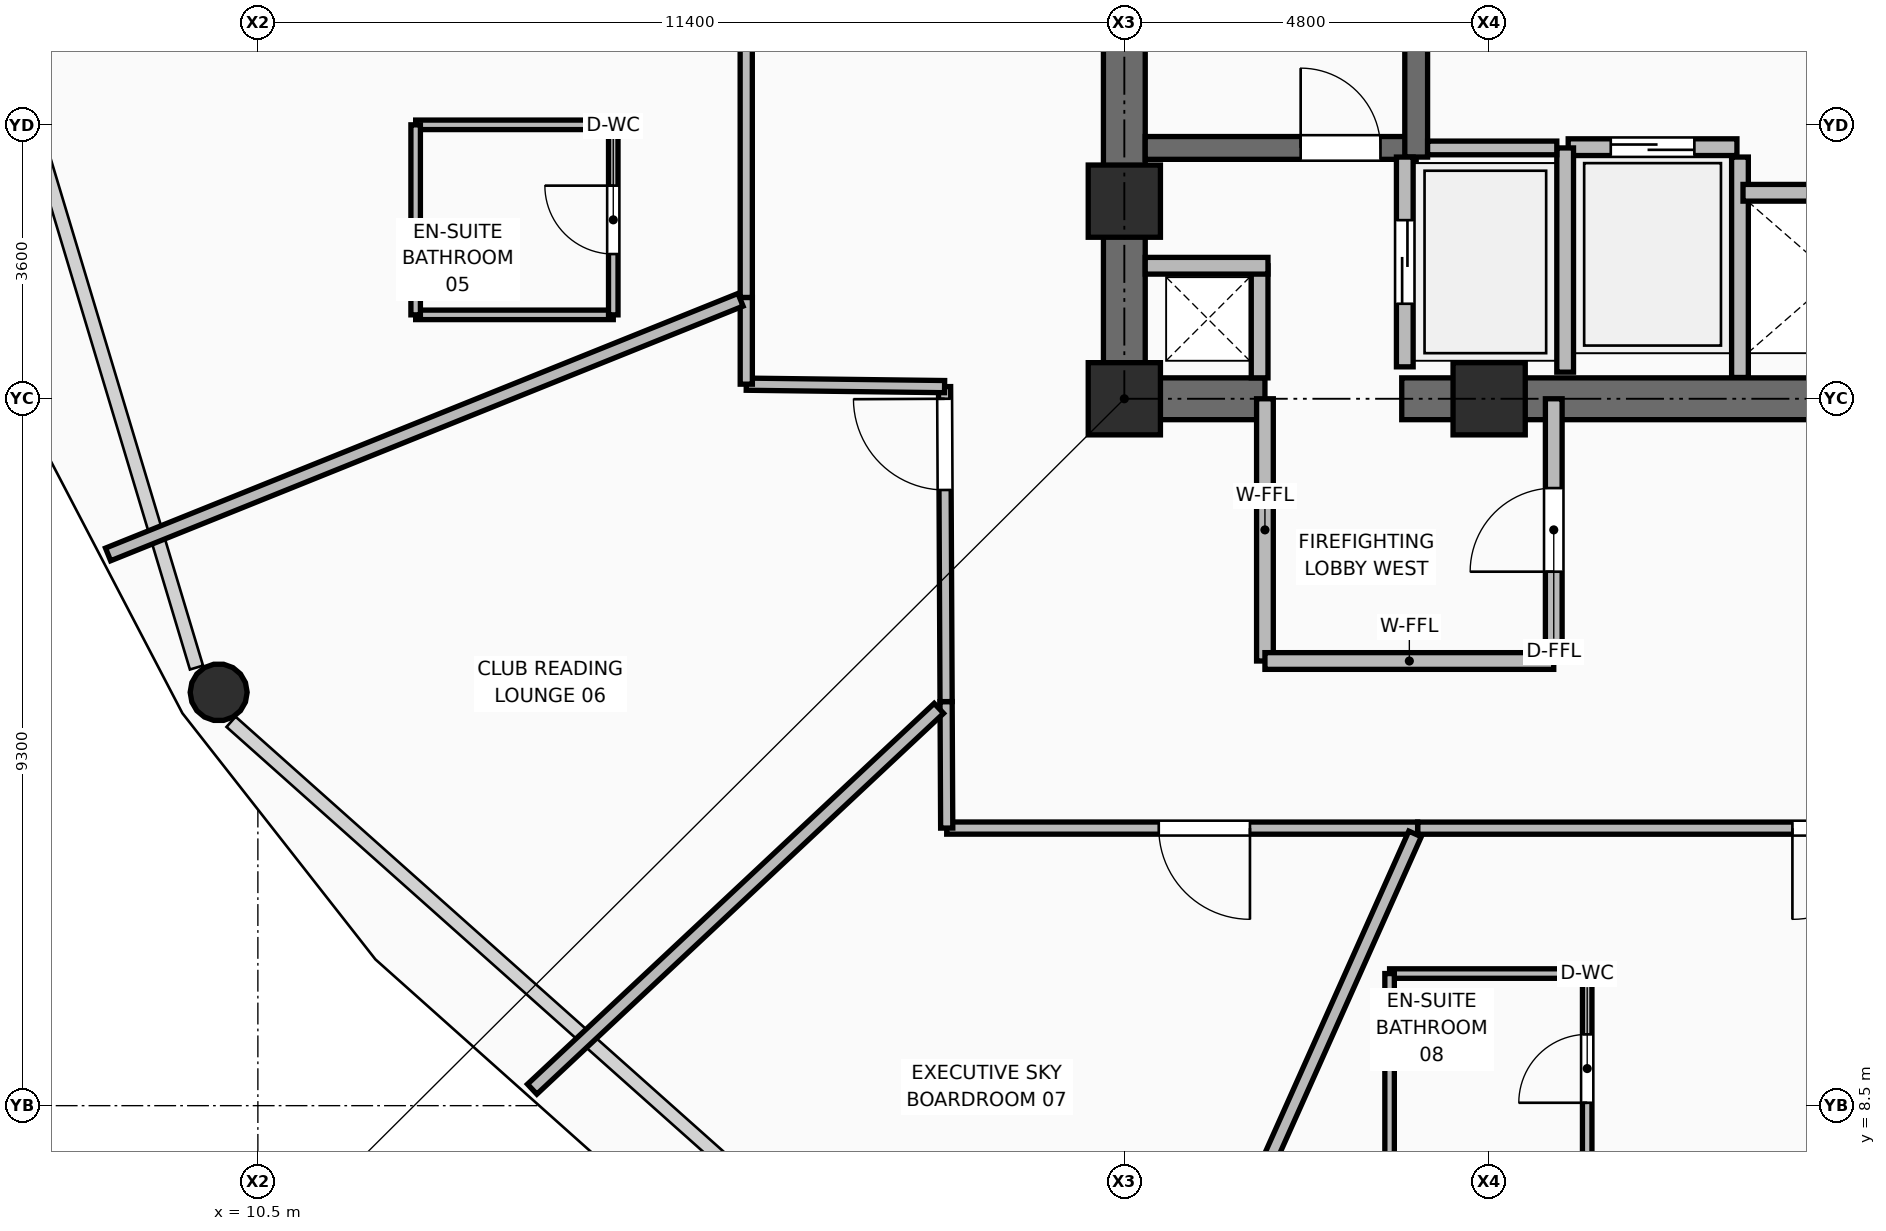
"""IFC4 building model, lengths in metres.
Left out: names, types, materials, properties, quantities, classifications, styles, units other than length and angle.
Written with IfcOpenShell. Run it as: python <this file> out.ifc"""

import sys

from ifc_helpers import new_model, si_unit, direction, frame, frame_2d, origin, origin_2d, place, context, subcontext, project, spatial, rectangle, hollow_circle, extrude, element, fill, save


model = new_model("IFC4")
c1 = context("Model", 3, precision=1e-05, world=origin(), true_north=direction((0.0, 1.0)))
c2 = subcontext(c1, "Body", "Model", "MODEL_VIEW")
j1 = project(units=[si_unit("LENGTHUNIT", "METRE"), si_unit("PLANEANGLEUNIT", "RADIAN")], contexts=[c1])
p1 = place(None, origin())
s1 = spatial("IfcSite", under=j1, at=p1, CompositionType="ELEMENT")
p2 = place(p1, origin())
s2 = spatial("IfcBuilding", under=s1, at=p2, CompositionType="ELEMENT")
p3 = place(p2, frame((0.0, 0.0, 145.95)))
s3 = spatial("IfcBuildingStorey", under=s2, at=p3, CompositionType="ELEMENT", Elevation=145.95)
for number, where, z_axis, x_axis in (
    (1, (21.9, 17.8, 0.0), (0.0, 0.0, 1.0), (1.0, 0.0, 0.0)),
    (2, (26.7, 17.8, 0.0), (0.0, 0.0, 1.0), (1.0, 0.0, 0.0)),
    (3, (21.9, 20.4, 0.0), (0.0, 0.0, 1.0), (1.0, 0.0, 0.0)),
):
    element("IfcColumn", number, at=place(p3, frame(where, z_axis=z_axis, x_axis=x_axis)), inside=s3, PredefinedType="COLUMN", context=c2, shape_type="SweptSolid", body=[
        extrude(rectangle(XDim=0.95, YDim=0.95, at=origin_2d()), origin(), (0.0, 0.0, 1.0), 3.75),
    ])
p4 = place(p3, frame((9.984, 13.938, 0.0), z_axis=(0.0149059359, 0.007589719656, 0.999860094829), x_axis=(-0.453742064917, 0.891133064432, 0.0)))
e4 = element("IfcColumn", 4, at=p4, inside=s3, PredefinedType="COLUMN", context=c2, shape_type="SweptSolid", body=[
    extrude(hollow_circle(Radius=0.375, WallThickness=0.035, at=origin_2d()), origin(), (0.0, 0.0, 1.0), 3.571),
])
p5 = place(p3, frame((30.0, 18.08, 0.0), z_axis=(0.0, 0.0, 1.0), x_axis=(0.0, 1.0, 0.0)))
e5 = element("IfcWall", 5, at=p5, inside=s3, PredefinedType="PARTITIONING", context=c2, shape_type="SweptSolid", body=[
    extrude(rectangle(XDim=2.9, YDim=0.22, at=frame_2d((1.45, 0.0))), origin(), (0.0, 0.0, 1.0), 3.545),
])
p6 = place(p3, frame((21.625, 17.8, 0.0), z_axis=(0.0, 0.0, 1.0), x_axis=(1.0, 0.0, 0.0)))
e6 = element("IfcWall", 6, at=p6, inside=s3, PredefinedType="SHEAR", context=c2, shape_type="SweptSolid", body=[
    extrude(rectangle(XDim=2.125, YDim=0.55, at=frame_2d((1.062, 0.0))), origin(), (0.0, 0.0, 1.0), 3.57),
])
p7 = place(p3, frame((25.55, 17.8, 0.0), z_axis=(0.0, 0.0, 1.0), x_axis=(1.0, 0.0, 0.0)))
e7 = element("IfcWall", 7, at=p7, inside=s3, PredefinedType="SHEAR", context=c2, shape_type="SweptSolid", body=[
    extrude(rectangle(XDim=6.9, YDim=0.55, at=frame_2d((3.45, 0.0))), origin(), (0.0, 0.0, 1.0), 3.57),
])
p8 = place(p3, frame((21.9, 18.075, 0.0), z_axis=(0.0, 0.0, 1.0), x_axis=(0.0, 1.0, 0.0)))
e8 = element("IfcWall", 8, at=p8, inside=s3, PredefinedType="SHEAR", context=c2, shape_type="SweptSolid", body=[
    extrude(rectangle(XDim=14.1, YDim=0.55, at=frame_2d((7.05, 0.0))), origin(), (0.0, 0.0, 1.0), 3.57),
])
p9 = place(p3, frame((22.175, 21.1, 0.0), z_axis=(0.0, 0.0, 1.0), x_axis=(1.0, 0.0, 0.0)))
e9 = element("IfcWall", 9, at=p9, inside=s3, PredefinedType="SHEAR", context=c2, shape_type="SweptSolid", body=[
    extrude(rectangle(XDim=3.565, YDim=0.3, at=frame_2d((1.782, 0.0))), origin(), (0.0, 0.0, 1.0), 3.57),
])
p10 = place(p9, frame((2.045, 0.0, 0.0)))
e10 = element("IfcOpeningElement", 10, at=p10, cuts=e9, PredefinedType="OPENING", context=c2, shape_type="SweptSolid", body=[
    extrude(rectangle(XDim=1.05, YDim=2.1, at=frame_2d((0.525, 1.05))), frame((0.0, 0.16, 0.0), z_axis=(0.0, -1.0, 0.0), x_axis=(1.0, 0.0, 0.0)), (0.0, 0.0, 1.0), 0.32),
])
p11 = place(p3, frame((25.74, 20.98, 0.0), z_axis=(0.0, 0.0, 1.0), x_axis=(0.0, 1.0, 0.0)))
e11 = element("IfcWall", 11, at=p11, inside=s3, PredefinedType="SHEAR", context=c2, shape_type="SweptSolid", body=[
    extrude(rectangle(XDim=7.99, YDim=0.3, at=frame_2d((3.995, 0.0))), origin(), (0.0, 0.0, 1.0), 3.57),
])
p12 = place(p3, frame((23.68, 18.075, 0.0), z_axis=(0.0, 0.0, 1.0), x_axis=(0.0, 1.0, 0.0)))
e12 = element("IfcWall", 12, at=p12, inside=s3, PredefinedType="PARTITIONING", context=c2, shape_type="SweptSolid", body=[
    extrude(rectangle(XDim=1.475, YDim=0.22, at=frame_2d((0.738, 0.0))), origin(), (0.0, 0.0, 1.0), 3.55),
])
p13 = place(p3, frame((22.175, 19.55, 0.0), z_axis=(0.0, 0.0, 1.0), x_axis=(1.0, 0.0, 0.0)))
e13 = element("IfcWall", 13, at=p13, inside=s3, PredefinedType="PARTITIONING", context=c2, shape_type="SweptSolid", body=[
    extrude(rectangle(XDim=1.615, YDim=0.22, at=frame_2d((0.808, 0.0))), origin(), (0.0, 0.0, 1.0), 2.595),
])
p14 = place(p3, frame((25.59, 18.22, 0.0), z_axis=(0.0, 0.0, 1.0), x_axis=(0.0, 1.0, 0.0)))
e14 = element("IfcWall", 14, at=p14, inside=s3, PredefinedType="PARTITIONING", context=c2, shape_type="SweptSolid", body=[
    extrude(rectangle(XDim=2.76, YDim=0.22, at=frame_2d((1.38, 0.0))), origin(), (0.0, 0.0, 1.0), 3.55),
])
p15 = place(p14, frame((0.83, 0.0, 0.0)))
e15 = element("IfcOpeningElement", 15, at=p15, cuts=e14, PredefinedType="OPENING", context=c2, shape_type="SweptSolid", body=[
    extrude(rectangle(XDim=1.1, YDim=2.2, at=frame_2d((0.55, 1.1))), frame((0.0, 0.12, 0.0), z_axis=(0.0, -1.0, 0.0), x_axis=(1.0, 0.0, 0.0)), (0.0, 0.0, 1.0), 0.24),
])
p16 = place(p3, frame((27.74, 21.11, 0.0), z_axis=(0.0, 0.0, 1.0), x_axis=(1.0, 0.0, 0.0)))
e16 = element("IfcWall", 16, at=p16, inside=s3, PredefinedType="PARTITIONING", context=c2, shape_type="SweptSolid", body=[
    extrude(rectangle(XDim=2.22, YDim=0.22, at=frame_2d((1.11, 0.0))), origin(), (0.0, 0.0, 1.0), 3.55),
])
p17 = place(p16, frame((0.56, 0.0, 0.0)))
e17 = element("IfcOpeningElement", 17, at=p17, cuts=e16, PredefinedType="OPENING", context=c2, shape_type="SweptSolid", body=[
    extrude(rectangle(XDim=1.1, YDim=2.2, at=frame_2d((0.55, 1.1))), frame((0.0, 0.12, 0.0), z_axis=(0.0, -1.0, 0.0), x_axis=(1.0, 0.0, 0.0)), (0.0, 0.0, 1.0), 0.24),
])
p18 = place(p3, frame((30.04, 20.51, 0.0), z_axis=(0.0, 0.0, 1.0), x_axis=(1.0, 0.0, 0.0)))
e18 = element("IfcWall", 18, at=p18, inside=s3, PredefinedType="PARTITIONING", context=c2, shape_type="SweptSolid", body=[
    extrude(rectangle(XDim=2.42, YDim=0.22, at=frame_2d((1.21, 0.0))), origin(), (0.0, 0.0, 1.0), 3.55),
])
p19 = place(p3, frame((27.7, 18.15, 0.0), z_axis=(0.0, 0.0, 1.0), x_axis=(0.0, 1.0, 0.0)))
e19 = element("IfcWall", 19, at=p19, inside=s3, PredefinedType="PARTITIONING", context=c2, shape_type="SweptSolid", body=[
    extrude(rectangle(XDim=2.95, YDim=0.22, at=frame_2d((1.475, 0.0))), origin(), (0.0, 0.0, 1.0), 3.55),
])
p20 = place(p3, frame((25.89, 21.1, 0.0), z_axis=(0.0, 0.0, 1.0), x_axis=(1.0, 0.0, 0.0)))
e20 = element("IfcWall", 20, at=p20, inside=s3, PredefinedType="PARTITIONING", context=c2, shape_type="SweptSolid", body=[
    extrude(rectangle(XDim=1.7, YDim=0.18, at=frame_2d((0.85, 0.0))), origin(), (0.0, 0.0, 1.0), 3.55),
])
p21 = place(p3, frame((23.75, 14.35, 0.0), z_axis=(0.0, 0.0, 1.0), x_axis=(0.0, 1.0, 0.0)))
e21 = element("IfcWall", 21, at=p21, inside=s3, PredefinedType="PARTITIONING", context=c2, shape_type="SweptSolid", body=[
    extrude(rectangle(XDim=3.45, YDim=0.22, at=frame_2d((1.725, 0.0))), origin(), (0.0, 0.0, 1.0), 3.006),
])
p22 = place(p3, frame((23.75, 14.35, 0.0), z_axis=(0.0, 0.0, 1.0), x_axis=(1.0, 0.0, 0.0)))
e22 = element("IfcWall", 22, at=p22, inside=s3, PredefinedType="PARTITIONING", context=c2, shape_type="SweptSolid", body=[
    extrude(rectangle(XDim=3.8, YDim=0.22, at=frame_2d((1.9, 0.0))), origin(), (0.0, 0.0, 1.0), 3.55),
])
p23 = place(p3, frame((27.55, 14.35, 0.0), z_axis=(0.0, 0.0, 1.0), x_axis=(0.0, 1.0, 0.0)))
e23 = element("IfcWall", 23, at=p23, inside=s3, PredefinedType="PARTITIONING", context=c2, shape_type="SweptSolid", body=[
    extrude(rectangle(XDim=3.45, YDim=0.22, at=frame_2d((1.725, 0.0))), origin(), (0.0, 0.0, 1.0), 3.006),
])
p24 = place(p23, frame((1.175, 0.0, 0.0)))
e24 = element("IfcOpeningElement", 24, at=p24, cuts=e23, PredefinedType="OPENING", context=c2, shape_type="SweptSolid", body=[
    extrude(rectangle(XDim=1.1, YDim=2.1, at=frame_2d((0.55, 1.05))), frame((0.0, 0.12, 0.0), z_axis=(0.0, -1.0, 0.0), x_axis=(1.0, 0.0, 0.0)), (0.0, 0.0, 1.0), 0.24),
])
p25 = place(p3, frame((36.672, 12.151, 0.0), z_axis=(0.0, 0.0, 1.0), x_axis=(-1.0, 0.0, 0.0)))
e25 = element("IfcWall", 25, at=p25, inside=s3, PredefinedType="PARTITIONING", context=c2, shape_type="SweptSolid", body=[
    extrude(rectangle(XDim=10.913, YDim=0.16, at=frame_2d((5.457, 0.0))), origin(), (0.0, 0.0, 1.0), 3.006),
])
p26 = place(p25, frame((4.782, 0.0, 0.0)))
e26 = element("IfcOpeningElement", 26, at=p26, cuts=e25, PredefinedType="OPENING", context=c2, shape_type="SweptSolid", body=[
    extrude(rectangle(XDim=1.2, YDim=2.1, at=frame_2d((0.6, 1.05))), frame((0.0, 0.09, 0.0), z_axis=(0.0, -1.0, 0.0), x_axis=(1.0, 0.0, 0.0)), (0.0, 0.0, 1.0), 0.18),
])
p27 = place(p3, frame((25.759, 12.151, 0.0), z_axis=(0.0, 0.0, 1.0), x_axis=(-0.999999980593, 0.000197013275, 0.0)))
e27 = element("IfcWall", 27, at=p27, inside=s3, PredefinedType="PARTITIONING", context=c2, shape_type="SweptSolid", body=[
    extrude(rectangle(XDim=6.196, YDim=0.16, at=frame_2d((3.098, 0.0))), origin(), (0.0, 0.0, 1.0), 3.006),
])
p28 = place(p27, frame((2.206, 0.0, 0.0)))
e28 = element("IfcOpeningElement", 28, at=p28, cuts=e27, PredefinedType="OPENING", context=c2, shape_type="SweptSolid", body=[
    extrude(rectangle(XDim=1.2, YDim=2.1, at=frame_2d((0.6, 1.05))), frame((0.0, 0.09, 0.0), z_axis=(0.0, -1.0, 0.0), x_axis=(1.0, 0.0, 0.0)), (0.0, 0.0, 1.0), 0.18),
])
p29 = place(p3, frame((19.563, 12.152, 0.0), z_axis=(0.0, 0.0, 1.0), x_axis=(-0.004842202953, 0.999988276467, 0.0)))
e29 = element("IfcWall", 29, at=p29, inside=s3, PredefinedType="PARTITIONING", context=c2, shape_type="SweptSolid", body=[
    extrude(rectangle(XDim=1.664, YDim=0.16, at=frame_2d((0.832, 0.0))), origin(), (0.0, 0.0, 1.0), 3.55),
])
p30 = place(p3, frame((19.555, 13.816, 0.0), z_axis=(0.0, 0.0, 1.0), x_axis=(-0.004830861504, 0.99998833132, 0.0)))
e30 = element("IfcWall", 30, at=p30, inside=s3, PredefinedType="PARTITIONING", context=c2, shape_type="SweptSolid", body=[
    extrude(rectangle(XDim=4.144, YDim=0.16, at=frame_2d((2.072, 0.0))), origin(), (0.0, 0.0, 1.0), 3.006),
])
p31 = place(p30, frame((2.784, 0.0, 0.0)))
e31 = element("IfcOpeningElement", 31, at=p31, cuts=e30, PredefinedType="OPENING", context=c2, shape_type="SweptSolid", body=[
    extrude(rectangle(XDim=1.2, YDim=2.1, at=frame_2d((0.6, 1.05))), frame((0.0, 0.09, 0.0), z_axis=(0.0, -1.0, 0.0), x_axis=(1.0, 0.0, 0.0)), (0.0, 0.0, 1.0), 0.18),
])
p32 = place(p3, frame((19.535, 17.96, 0.0), z_axis=(0.0, 0.0, 1.0), x_axis=(-0.999924866554, 0.012258109444, 0.0)))
e32 = element("IfcWall", 32, at=p32, inside=s3, PredefinedType="PARTITIONING", context=c2, shape_type="SweptSolid", body=[
    extrude(rectangle(XDim=2.609, YDim=0.16, at=frame_2d((1.305, 0.0))), origin(), (0.0, 0.0, 1.0), 3.55),
])
p33 = place(p3, frame((16.926, 17.992, 0.0), z_axis=(0.0, 0.0, 1.0), x_axis=(0.0, 1.0, 0.0)))
e33 = element("IfcWall", 33, at=p33, inside=s3, PredefinedType="PARTITIONING", context=c2, shape_type="SweptSolid", body=[
    extrude(rectangle(XDim=1.141, YDim=0.16, at=frame_2d((0.571, 0.0))), origin(), (0.0, 0.0, 1.0), 3.55),
])
p34 = place(p3, frame((16.926, 19.133, 0.0), z_axis=(0.0, 0.0, 1.0), x_axis=(-0.000206857316, 0.999999978605, 0.0)))
e34 = element("IfcWall", 34, at=p34, inside=s3, PredefinedType="PARTITIONING", context=c2, shape_type="SweptSolid", body=[
    extrude(rectangle(XDim=4.721, YDim=0.16, at=frame_2d((2.36, 0.0))), origin(), (0.0, 0.0, 1.0), 3.006),
])
p35 = place(p3, frame((16.85, 19.102, 0.0), z_axis=(0.0, 0.0, 1.0), x_axis=(-0.927640946313, -0.373473258378, 0.0)))
e35 = element("IfcWall", 35, at=p35, inside=s3, PredefinedType="PARTITIONING", context=c2, shape_type="SweptSolid", body=[
    extrude(rectangle(XDim=8.97, YDim=0.18, at=frame_2d((4.485, 0.0))), origin(), (0.0, 0.0, 1.0), 2.852),
])
p36 = place(p3, frame((19.46, 13.727, 0.0), z_axis=(0.0, 0.0, 1.0), x_axis=(-0.72998781112, -0.683460163884, 0.0)))
e36 = element("IfcWall", 36, at=p36, inside=s3, PredefinedType="PARTITIONING", context=c2, shape_type="SweptSolid", body=[
    extrude(rectangle(XDim=7.33, YDim=0.18, at=frame_2d((3.665, 0.0))), origin(), (0.0, 0.0, 1.0), 2.852),
])
p37 = place(p3, frame((25.725, 12.075, 0.0), z_axis=(0.0, 0.0, 1.0), x_axis=(-0.40799937457, -0.912982207029, 0.0)))
e37 = element("IfcWall", 37, at=p37, inside=s3, PredefinedType="PARTITIONING", context=c2, shape_type="SweptSolid", body=[
    extrude(rectangle(XDim=8.76, YDim=0.18, at=frame_2d((4.38, 0.0))), origin(), (0.0, 0.0, 1.0), 2.852),
])
for number, where, z_axis, x_axis in (
    (38, (12.576, 18.904, 0.0), (0.0, 0.0, 1.0), (1.0, 0.0, 0.0)),
    (39, (12.576, 21.404, 0.0), (0.0, 0.0, 1.0), (1.0, 0.0, 0.0)),
):
    element("IfcWall", number, at=place(p3, frame(where, z_axis=z_axis, x_axis=x_axis)), inside=s3, PredefinedType="PARTITIONING", context=c2, shape_type="SweptSolid", body=[
        extrude(rectangle(XDim=2.6, YDim=0.125, at=frame_2d((1.3, 0.0))), origin(), (0.0, 0.0, 1.0), 3.55),
    ])
p38 = place(p3, frame((12.576, 18.904, 0.0), z_axis=(0.0, 0.0, 1.0), x_axis=(0.0, 1.0, 0.0)))
e40 = element("IfcWall", 40, at=p38, inside=s3, PredefinedType="PARTITIONING", context=c2, shape_type="SweptSolid", body=[
    extrude(rectangle(XDim=2.5, YDim=0.125, at=frame_2d((1.25, 0.0))), origin(), (0.0, 0.0, 1.0), 3.55),
])
p39 = place(p3, frame((15.176, 18.904, 0.0), z_axis=(0.0, 0.0, 1.0), x_axis=(0.0, 1.0, 0.0)))
e41 = element("IfcWall", 41, at=p39, inside=s3, PredefinedType="PARTITIONING", context=c2, shape_type="SweptSolid", body=[
    extrude(rectangle(XDim=2.5, YDim=0.125, at=frame_2d((1.25, 0.0))), origin(), (0.0, 0.0, 1.0), 3.55),
])
p40 = place(p39, frame((0.8, 0.0, 0.0)))
e42 = element("IfcOpeningElement", 42, at=p40, cuts=e41, PredefinedType="OPENING", context=c2, shape_type="SweptSolid", body=[
    extrude(rectangle(XDim=0.9, YDim=2.1, at=frame_2d((0.45, 1.05))), frame((0.0, 0.073, 0.0), z_axis=(0.0, -1.0, 0.0), x_axis=(1.0, 0.0, 0.0)), (0.0, 0.0, 1.0), 0.145),
])
p41 = place(p3, frame((25.39, 10.238, 0.0), z_axis=(0.0, 0.0, 1.0), x_axis=(1.0, 0.0, 0.0)))
e43 = element("IfcWall", 43, at=p41, inside=s3, PredefinedType="PARTITIONING", context=c2, shape_type="SweptSolid", body=[
    extrude(rectangle(XDim=2.6, YDim=0.125, at=frame_2d((1.3, 0.0))), origin(), (0.0, 0.0, 1.0), 3.55),
])
p42 = place(p3, frame((25.39, 7.738, 0.0), z_axis=(0.0, 0.0, 1.0), x_axis=(0.0, 1.0, 0.0)))
e44 = element("IfcWall", 44, at=p42, inside=s3, PredefinedType="PARTITIONING", context=c2, shape_type="SweptSolid", body=[
    extrude(rectangle(XDim=2.5, YDim=0.125, at=frame_2d((1.25, 0.0))), origin(), (0.0, 0.0, 1.0), 3.55),
])
p43 = place(p3, frame((27.99, 7.738, 0.0), z_axis=(0.0, 0.0, 1.0), x_axis=(0.0, 1.0, 0.0)))
e45 = element("IfcWall", 45, at=p43, inside=s3, PredefinedType="PARTITIONING", context=c2, shape_type="SweptSolid", body=[
    extrude(rectangle(XDim=2.5, YDim=0.125, at=frame_2d((1.25, 0.0))), origin(), (0.0, 0.0, 1.0), 3.55),
])
p44 = place(p43, frame((0.8, 0.0, 0.0)))
e46 = element("IfcOpeningElement", 46, at=p44, cuts=e45, PredefinedType="OPENING", context=c2, shape_type="SweptSolid", body=[
    extrude(rectangle(XDim=0.9, YDim=2.1, at=frame_2d((0.45, 1.05))), frame((0.0, 0.073, 0.0), z_axis=(0.0, -1.0, 0.0), x_axis=(1.0, 0.0, 0.0)), (0.0, 0.0, 1.0), 0.145),
])
p45 = place(p10, origin())
e47 = element("IfcDoor", 47, at=p45, inside=s3, OperationType="SINGLE_SWING_LEFT", PredefinedType="DOOR", context=c2, shape_type="SweptSolid", body=[
    extrude(rectangle(XDim=1.05, YDim=2.1, at=frame_2d((0.525, 1.05))), frame((0.0, 0.025, 0.0), z_axis=(0.0, -1.0, 0.0), x_axis=(1.0, 0.0, 0.0)), (0.0, 0.0, 1.0), 0.05),
])
fill(e10, e47)
p46 = place(p15, origin())
e48 = element("IfcDoor", 48, at=p46, inside=s3, OperationType="DOUBLE_DOOR_SLIDING", PredefinedType="DOOR", context=c2, shape_type="SweptSolid", body=[
    extrude(rectangle(XDim=1.1, YDim=2.2, at=frame_2d((0.55, 1.1))), frame((0.0, 0.025, 0.0), z_axis=(0.0, -1.0, 0.0), x_axis=(1.0, 0.0, 0.0)), (0.0, 0.0, 1.0), 0.05),
])
fill(e15, e48)
p47 = place(p17, origin())
e49 = element("IfcDoor", 49, at=p47, inside=s3, OperationType="DOUBLE_DOOR_SLIDING", PredefinedType="DOOR", context=c2, shape_type="SweptSolid", body=[
    extrude(rectangle(XDim=1.1, YDim=2.2, at=frame_2d((0.55, 1.1))), frame((0.0, 0.025, 0.0), z_axis=(0.0, -1.0, 0.0), x_axis=(1.0, 0.0, 0.0)), (0.0, 0.0, 1.0), 0.05),
])
fill(e17, e49)
p48 = place(p24, origin())
e50 = element("IfcDoor", 50, at=p48, inside=s3, OperationType="SINGLE_SWING_LEFT", PredefinedType="DOOR", context=c2, shape_type="SweptSolid", body=[
    extrude(rectangle(XDim=1.1, YDim=2.1, at=frame_2d((0.55, 1.05))), frame((0.0, 0.025, 0.0), z_axis=(0.0, -1.0, 0.0), x_axis=(1.0, 0.0, 0.0)), (0.0, 0.0, 1.0), 0.05),
])
fill(e24, e50)
p49 = place(p40, origin())
e51 = element("IfcDoor", 51, at=p49, inside=s3, OperationType="SINGLE_SWING_RIGHT", PredefinedType="DOOR", context=c2, shape_type="SweptSolid", body=[
    extrude(rectangle(XDim=0.9, YDim=2.1, at=frame_2d((0.45, 1.05))), frame((0.0, 0.025, 0.0), z_axis=(0.0, -1.0, 0.0), x_axis=(1.0, 0.0, 0.0)), (0.0, 0.0, 1.0), 0.05),
])
fill(e42, e51)
p50 = place(p31, origin())
e52 = element("IfcDoor", 52, at=p50, inside=s3, OperationType="SINGLE_SWING_RIGHT", PredefinedType="DOOR", context=c2, shape_type="SweptSolid", body=[
    extrude(rectangle(XDim=1.2, YDim=2.1, at=frame_2d((0.6, 1.05))), frame((0.0, 0.025, 0.0), z_axis=(0.0, -1.0, 0.0), x_axis=(1.0, 0.0, 0.0)), (0.0, 0.0, 1.0), 0.05),
])
fill(e31, e52)
p51 = place(p28, origin())
e53 = element("IfcDoor", 53, at=p51, inside=s3, OperationType="SINGLE_SWING_LEFT", PredefinedType="DOOR", context=c2, shape_type="SweptSolid", body=[
    extrude(rectangle(XDim=1.2, YDim=2.1, at=frame_2d((0.6, 1.05))), frame((0.0, 0.025, 0.0), z_axis=(0.0, -1.0, 0.0), x_axis=(1.0, 0.0, 0.0)), (0.0, 0.0, 1.0), 0.05),
])
fill(e28, e53)
p52 = place(p44, origin())
e54 = element("IfcDoor", 54, at=p52, inside=s3, OperationType="SINGLE_SWING_LEFT", PredefinedType="DOOR", context=c2, shape_type="SweptSolid", body=[
    extrude(rectangle(XDim=0.9, YDim=2.1, at=frame_2d((0.45, 1.05))), frame((0.0, 0.025, 0.0), z_axis=(0.0, -1.0, 0.0), x_axis=(1.0, 0.0, 0.0)), (0.0, 0.0, 1.0), 0.05),
])
fill(e46, e54)
p53 = place(p26, origin())
e55 = element("IfcDoor", 55, at=p53, inside=s3, OperationType="SINGLE_SWING_RIGHT", PredefinedType="DOOR", context=c2, shape_type="SweptSolid", body=[
    extrude(rectangle(XDim=1.2, YDim=2.1, at=frame_2d((0.6, 1.05))), frame((0.0, 0.025, 0.0), z_axis=(0.0, -1.0, 0.0), x_axis=(1.0, 0.0, 0.0)), (0.0, 0.0, 1.0), 0.05),
])
fill(e26, e55)
save(model, sys.argv[1])
